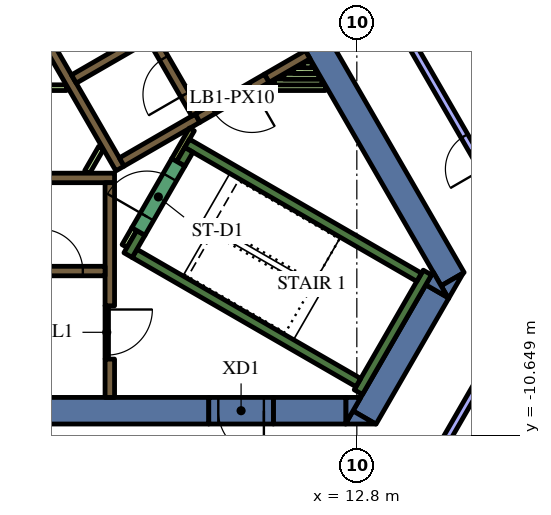
"""IFC4 building model, lengths in metres.
Left out: names, types, materials, properties, quantities, classifications, styles, units other than length and angle.
Written with IfcOpenShell. Run it as: python <this file> out.ifc"""

import sys

from ifc_helpers import new_model, si_unit, direction, frame, frame_2d, origin, place, context, subcontext, project, spatial, polyline, rectangle, outline, extrude, element, fill, save


model = new_model("IFC4")
c1 = context("Model", 3, precision=1e-05, world=origin(), true_north=direction((0.0, 1.0)))
c2 = subcontext(c1, "Body", "Model", "MODEL_VIEW")
j1 = project(units=[si_unit("LENGTHUNIT", "METRE"), si_unit("PLANEANGLEUNIT", "RADIAN")], contexts=[c1])
p1 = place(None, origin())
s1 = spatial("IfcSite", under=j1, at=p1, CompositionType="ELEMENT")
p2 = place(p1, origin())
s2 = spatial("IfcBuilding", under=s1, at=p2, CompositionType="ELEMENT")
p3 = place(p2, frame((0.0, 0.0, 247.8)))
s3 = spatial("IfcBuildingStorey", under=s2, at=p3, CompositionType="ELEMENT", Elevation=247.8)
p4 = place(p3, frame((9.085, 4.264, 0.0), z_axis=(0.0, 0.0, 1.0), x_axis=(0.499998082512, -0.866026510844, 0.0)))
e1 = element("IfcWall", 1, at=p4, inside=s3, PredefinedType="SOLIDWALL", context=c2, shape_type="SweptSolid", body=[
    extrude(rectangle(XDim=12.472, YDim=0.7, at=frame_2d((6.236, 0.0))), origin(), (0.0, 0.0, 1.0), 4.2),
])
p5 = place(p3, origin())
e2 = element("IfcWall", 2, at=p5, inside=s3, PredefinedType="SOLIDWALL", context=c2, shape_type="SweptSolid", body=[
    extrude(outline(polyline([(15.213, -7.05), (15.019, -6.714), (15.601, -6.378), (15.213, -7.05)])), origin(), (0.0, 0.0, 1.0), 4.2),
])
p6 = place(p3, frame((13.003, -10.179, 0.0), z_axis=(0.0, 0.0, 1.0), x_axis=(0.499972675833, 0.866041178825, 0.0)))
e3 = element("IfcWall", 3, at=p6, inside=s3, PredefinedType="SOLIDWALL", context=c2, shape_type="SweptSolid", body=[
    extrude(rectangle(XDim=3.829, YDim=0.7, at=frame_2d((1.915, 0.0))), origin(), (0.0, 0.0, 1.0), 4.2),
])
e4 = element("IfcWall", 4, at=p5, inside=s3, PredefinedType="SOLIDWALL", context=c2, shape_type="SweptSolid", body=[
    extrude(outline(polyline([(12.5, -10.35), (12.698, -10.005), (13.296, -10.35), (12.5, -10.35)])), origin(), (0.0, 0.0, 1.0), 4.2),
])
e5 = element("IfcWall", 5, at=p5, inside=s3, PredefinedType="SOLIDWALL", context=c2, shape_type="SweptSolid", body=[
    extrude(outline(polyline([(14.809, -6.35), (15.197, -7.022), (14.615, -6.686), (14.809, -6.35)])), origin(), (0.0, 0.0, 1.0), 4.2),
])
p7 = place(p3, frame((10.604, -10.0, 0.0), z_axis=(0.0, 0.0, 1.0), x_axis=(1.0, 0.0, 0.0)))
e6 = element("IfcWall", 6, at=p7, inside=s3, PredefinedType="SOLIDWALL", context=c2, shape_type="SweptSolid", body=[
    extrude(rectangle(XDim=1.909, YDim=0.7, at=frame_2d((0.955, 0.0))), origin(), (0.0, 0.0, 1.0), 4.2),
])
e7 = element("IfcWall", 7, at=p5, inside=s3, PredefinedType="SOLIDWALL", context=c2, shape_type="SweptSolid", body=[
    extrude(outline(polyline([(12.904, -9.65), (12.516, -10.322), (12.516, -9.65), (12.904, -9.65)])), origin(), (0.0, 0.0, 1.0), 4.2),
])
p8 = place(p3, frame((8.904, -10.0, 0.0), z_axis=(0.0, 0.0, 1.0), x_axis=(-1.0, 0.0, 0.0)))
e8 = element("IfcWall", 8, at=p8, inside=s3, PredefinedType="SOLIDWALL", context=c2, shape_type="SweptSolid", body=[
    extrude(rectangle(XDim=22.226, YDim=0.7, at=frame_2d((11.113, 0.0))), origin(), (0.0, 0.0, 1.0), 4.2),
])
p9 = place(p3, frame((12.84, -9.511, 0.0), z_axis=(0.0, 0.0, 1.0), x_axis=(0.500048121057, 0.865997619297, 0.0)))
e9 = element("IfcWall", 9, at=p9, inside=s3, PredefinedType="SOLIDWALL", context=c2, shape_type="SweptSolid", body=[
    extrude(rectangle(XDim=3.634, YDim=0.25, at=frame_2d((1.817, 0.0))), origin(), (0.0, 0.0, 1.0), 4.2),
])
p10 = place(p3, frame((12.84, -9.261, 0.0), z_axis=(0.0, 0.0, 1.0), x_axis=(-0.866013990052, 0.500019768644, 0.0)))
e10 = element("IfcWall", 10, at=p10, inside=s3, PredefinedType="SOLIDWALL", context=c2, shape_type="SweptSolid", body=[
    extrude(rectangle(XDim=6.8, YDim=0.25, at=frame_2d((3.4, 0.0))), origin(), (0.0, 0.0, 1.0), 4.2),
])
p11 = place(p3, frame((6.78, -5.906, 0.0), z_axis=(0.0, 0.0, 1.0), x_axis=(0.500223362819, 0.865896406789, 0.0)))
e11 = element("IfcWall", 11, at=p11, inside=s3, PredefinedType="SOLIDWALL", context=c2, shape_type="SweptSolid", body=[
    extrude(rectangle(XDim=0.675, YDim=0.25, at=frame_2d((0.337, 0.0))), origin(), (0.0, 0.0, 1.0), 4.2),
])
p12 = place(p3, frame((8.334, -2.964, 0.0), z_axis=(0.0, 0.0, 1.0), x_axis=(0.866016039709, -0.500016218704, 0.0)))
e12 = element("IfcWall", 12, at=p12, inside=s3, PredefinedType="SOLIDWALL", context=c2, shape_type="SweptSolid", body=[
    extrude(rectangle(XDim=7.05, YDim=0.25, at=frame_2d((3.525, 0.0))), origin(), (0.0, 0.0, 1.0), 4.2),
])
p13 = place(p3, frame((8.168, -3.503, 0.0), z_axis=(0.0, 0.0, 1.0), x_axis=(0.49972245349, 0.866185586049, 0.0)))
e13 = element("IfcWall", 13, at=p13, inside=s3, PredefinedType="SOLIDWALL", context=c2, shape_type="SweptSolid", body=[
    extrude(rectangle(XDim=0.425, YDim=0.25, at=frame_2d((0.212, 0.0))), origin(), (0.0, 0.0, 1.0), 4.2),
])
p14 = place(p3, frame((-5.545, -3.875, 0.0), z_axis=(0.0, 0.0, 1.0), x_axis=(1.0, 0.0, 0.0)))
e14 = element("IfcWall", 14, at=p14, inside=s3, PredefinedType="SOLIDWALL", context=c2, shape_type="SweptSolid", body=[
    extrude(rectangle(XDim=11.97, YDim=0.25, at=frame_2d((5.985, 0.0))), origin(), (0.0, 0.0, 1.0), 4.2),
])
p15 = place(p3, frame((6.3, -7.24, 0.0), z_axis=(0.0, 0.0, 1.0), x_axis=(0.0, 1.0, 0.0)))
e15 = element("IfcWall", 15, at=p15, inside=s3, PredefinedType="SOLIDWALL", context=c2, shape_type="SweptSolid", body=[
    extrude(rectangle(XDim=3.24, YDim=0.25, at=frame_2d((1.62, 0.0))), origin(), (0.0, 0.0, 1.0), 4.2),
])
p16 = place(p3, frame((6.3, -9.65, 0.0), z_axis=(0.0, 0.0, 1.0), x_axis=(0.0, 1.0, 0.0)))
e16 = element("IfcWall", 16, at=p16, inside=s3, PredefinedType="SOLIDWALL", context=c2, shape_type="SweptSolid", body=[
    extrude(rectangle(XDim=1.008, YDim=0.25, at=frame_2d((0.504, 0.0))), origin(), (0.0, 0.0, 1.0), 4.2),
])
p17 = place(p3, frame((11.507, -0.631, 0.0), z_axis=(0.0, 0.0, 1.0), x_axis=(-0.866025525965, -0.499999788377, 0.0)))
e17 = element("IfcWall", 17, at=p17, inside=s3, PredefinedType="SOLIDWALL", context=c2, shape_type="SweptSolid", body=[
    extrude(rectangle(XDim=1.245, YDim=0.25, at=frame_2d((0.622, 0.0))), origin(), (0.0, 0.0, 1.0), 4.2),
])
p18 = place(p3, frame((6.568, -3.627, 0.0), z_axis=(0.0, 0.0, 1.0), x_axis=(-0.499999455981, 0.866025717874, 0.0)))
e18 = element("IfcWall", 18, at=p18, inside=s3, PredefinedType="SOLIDWALL", context=c2, shape_type="SweptSolid", body=[
    extrude(rectangle(XDim=11.978, YDim=0.25, at=frame_2d((5.989, 0.0))), origin(), (0.0, 0.0, 1.0), 4.2),
])
p19 = place(p3, frame((5.354, -1.274, 0.0), z_axis=(0.0, 0.0, 1.0), x_axis=(0.866008176907, 0.50002983664, 0.0)))
e19 = element("IfcWall", 19, at=p19, inside=s3, PredefinedType="SOLIDWALL", context=c2, shape_type="SweptSolid", body=[
    extrude(rectangle(XDim=2.2, YDim=0.25, at=frame_2d((1.1, 0.0))), origin(), (0.0, 0.0, 1.0), 4.2),
])
p20 = place(p3, frame((6.614, -3.456, 0.0), z_axis=(0.0, 0.0, 1.0), x_axis=(0.866025089694, 0.500000544019, 0.0)))
e20 = element("IfcWall", 20, at=p20, inside=s3, PredefinedType="SOLIDWALL", context=c2, shape_type="SweptSolid", body=[
    extrude(rectangle(XDim=2.305, YDim=0.25, at=frame_2d((1.153, 0.0))), origin(), (0.0, 0.0, 1.0), 4.2),
])
p21 = place(p3, frame((10.362, -1.5, 0.0), z_axis=(0.0, 0.0, 1.0), x_axis=(1.0, 0.0, 0.0)))
e21 = element("IfcWall", 21, at=p21, inside=s3, PredefinedType="PARTITIONING", context=c2, shape_type="SweptSolid", body=[
    extrude(rectangle(XDim=1.61, YDim=0.15, at=frame_2d((0.805, 0.0))), origin(), (0.0, 0.0, 1.0), 3.45),
])
p22 = place(p3, frame((10.622, -1.35, 0.0), z_axis=(0.0, 0.0, 1.0), x_axis=(1.0, 0.0, 0.0)))
e22 = element("IfcWall", 22, at=p22, inside=s3, PredefinedType="PARTITIONING", context=c2, shape_type="SweptSolid", body=[
    extrude(rectangle(XDim=1.263, YDim=0.15, at=frame_2d((0.632, 0.0))), origin(), (0.0, 0.0, 1.0), 3.45),
])
p23 = place(p3, frame((10.882, -1.2, 0.0), z_axis=(0.0, 0.0, 1.0), x_axis=(1.0, 0.0, 0.0)))
e23 = element("IfcWall", 23, at=p23, inside=s3, PredefinedType="PARTITIONING", context=c2, shape_type="SweptSolid", body=[
    extrude(rectangle(XDim=0.917, YDim=0.15, at=frame_2d((0.459, 0.0))), origin(), (0.0, 0.0, 1.0), 3.45),
])
p24 = place(p3, frame((11.712, -1.05, 0.0), z_axis=(0.0, 0.0, 1.0), x_axis=(-1.0, 0.0, 0.0)))
e24 = element("IfcWall", 24, at=p24, inside=s3, PredefinedType="PARTITIONING", context=c2, shape_type="SweptSolid", body=[
    extrude(rectangle(XDim=0.571, YDim=0.15, at=frame_2d((0.285, 0.0))), origin(), (0.0, 0.0, 1.0), 3.45),
])
p25 = place(p3, frame((11.401, -0.9, 0.0), z_axis=(0.0, 0.0, 1.0), x_axis=(1.0, 0.0, 0.0)))
e25 = element("IfcWall", 25, at=p25, inside=s3, PredefinedType="PARTITIONING", context=c2, shape_type="SweptSolid", body=[
    extrude(rectangle(XDim=0.224, YDim=0.15, at=frame_2d((0.112, 0.0))), origin(), (0.0, 0.0, 1.0), 3.45),
])
p26 = place(p3, frame((6.945, -5.222, 0.0), z_axis=(0.0, 0.0, 1.0), x_axis=(-0.499818422106, -0.866130212453, 0.0)))
e26 = element("IfcWall", 26, at=p26, inside=s3, PredefinedType="PARTITIONING", context=c2, shape_type="SweptSolid", body=[
    extrude(rectangle(XDim=0.514, YDim=0.15, at=frame_2d((0.257, 0.0))), origin(), (0.0, 0.0, 1.0), 3.45),
])
p27 = place(p3, frame((8.459, -2.599, 0.0), z_axis=(0.0, 0.0, 1.0), x_axis=(-0.500041054325, -0.866001699761, 0.0)))
e27 = element("IfcWall", 27, at=p27, inside=s3, PredefinedType="PARTITIONING", context=c2, shape_type="SweptSolid", body=[
    extrude(rectangle(XDim=0.929, YDim=0.15, at=frame_2d((0.464, 0.0))), origin(), (0.0, 0.0, 1.0), 4.2),
])
p28 = place(p3, frame((5.705, -3.718, 0.0), z_axis=(0.0, 0.0, 1.0), x_axis=(0.499962090823, 0.866047289552, 0.0)))
e28 = element("IfcWall", 28, at=p28, inside=s3, PredefinedType="PARTITIONING", context=c2, shape_type="SweptSolid", body=[
    extrude(rectangle(XDim=0.735, YDim=0.15, at=frame_2d((0.367, 0.0))), origin(), (0.0, 0.0, 1.0), 3.45),
])
p29 = place(p3, frame((-4.2, -1.5, 0.0), z_axis=(0.0, 0.0, 1.0), x_axis=(1.0, 0.0, 0.0)))
e29 = element("IfcWall", 29, at=p29, inside=s3, PredefinedType="PARTITIONING", context=c2, shape_type="SweptSolid", body=[
    extrude(rectangle(XDim=9.359, YDim=0.15, at=frame_2d((4.68, 0.0))), origin(), (0.0, 0.0, 1.0), 3.45),
])
p30 = place(p3, frame((-6.175, -6.325, 0.0), z_axis=(0.0, 0.0, 1.0), x_axis=(1.0, 0.0, 0.0)))
e30 = element("IfcWall", 30, at=p30, inside=s3, PredefinedType="SOLIDWALL", context=c2, shape_type="SweptSolid", body=[
    extrude(rectangle(XDim=12.35, YDim=0.25, at=frame_2d((6.175, 0.0))), origin(), (0.0, 0.0, 1.0), 4.2),
])
p31 = place(p30, frame((0.585, 0.0, 0.0)))
e31 = element("IfcOpeningElement", 31, at=p31, cuts=e30, PredefinedType="OPENING", context=c2, shape_type="SweptSolid", body=[
    extrude(rectangle(XDim=1.1, YDim=2.1, at=frame_2d((0.55, 1.05))), frame((0.0, 0.135, 0.0), z_axis=(0.0, -1.0, 0.0), x_axis=(1.0, 0.0, 0.0)), (0.0, 0.0, 1.0), 0.27),
])
p32 = place(p30, frame((3.105, 0.0, 0.0)))
e32 = element("IfcOpeningElement", 32, at=p32, cuts=e30, PredefinedType="OPENING", context=c2, shape_type="SweptSolid", body=[
    extrude(rectangle(XDim=1.1, YDim=2.1, at=frame_2d((0.55, 1.05))), frame((0.0, 0.135, 0.0), z_axis=(0.0, -1.0, 0.0), x_axis=(1.0, 0.0, 0.0)), (0.0, 0.0, 1.0), 0.27),
])
p33 = place(p30, frame((5.625, 0.0, 0.0)))
e33 = element("IfcOpeningElement", 33, at=p33, cuts=e30, PredefinedType="OPENING", context=c2, shape_type="SweptSolid", body=[
    extrude(rectangle(XDim=1.1, YDim=2.1, at=frame_2d((0.55, 1.05))), frame((0.0, 0.135, 0.0), z_axis=(0.0, -1.0, 0.0), x_axis=(1.0, 0.0, 0.0)), (0.0, 0.0, 1.0), 0.27),
])
p34 = place(p30, frame((8.145, 0.0, 0.0)))
e34 = element("IfcOpeningElement", 34, at=p34, cuts=e30, PredefinedType="OPENING", context=c2, shape_type="SweptSolid", body=[
    extrude(rectangle(XDim=1.1, YDim=2.1, at=frame_2d((0.55, 1.05))), frame((0.0, 0.135, 0.0), z_axis=(0.0, -1.0, 0.0), x_axis=(1.0, 0.0, 0.0)), (0.0, 0.0, 1.0), 0.27),
])
p35 = place(p30, frame((10.665, 0.0, 0.0)))
e35 = element("IfcOpeningElement", 35, at=p35, cuts=e30, PredefinedType="OPENING", context=c2, shape_type="SweptSolid", body=[
    extrude(rectangle(XDim=1.1, YDim=2.1, at=frame_2d((0.55, 1.05))), frame((0.0, 0.135, 0.0), z_axis=(0.0, -1.0, 0.0), x_axis=(1.0, 0.0, 0.0)), (0.0, 0.0, 1.0), 0.27),
])
p36 = place(p3, frame((8.565, -2.185, 0.0), z_axis=(0.0, 0.0, 1.0), x_axis=(-0.499997954832, 0.866026584559, 0.0)))
e36 = element("IfcWall", 36, at=p36, inside=s3, PredefinedType="SOLIDWALL", context=c2, shape_type="SweptSolid", body=[
    extrude(rectangle(XDim=12.35, YDim=0.25, at=frame_2d((6.175, 0.0))), origin(), (0.0, 0.0, 1.0), 4.2),
])
p37 = place(p36, frame((0.585, 0.0, 0.0)))
e37 = element("IfcOpeningElement", 37, at=p37, cuts=e36, PredefinedType="OPENING", context=c2, shape_type="SweptSolid", body=[
    extrude(rectangle(XDim=1.1, YDim=2.1, at=frame_2d((0.55, 1.05))), frame((0.0, 0.135, 0.0), z_axis=(0.0, -1.0, 0.0), x_axis=(1.0, 0.0, 0.0)), (0.0, 0.0, 1.0), 0.27),
])
p38 = place(p3, frame((7.053, -5.284, 0.0), z_axis=(0.0, 0.0, 1.0), x_axis=(0.500078061341, 0.865980330357, 0.0)))
e38 = element("IfcWall", 38, at=p38, inside=s3, PredefinedType="SOLIDWALL", context=c2, shape_type="SweptSolid", body=[
    extrude(rectangle(XDim=2.1, YDim=0.4, at=frame_2d((1.05, 0.0))), origin(), (0.0, 0.0, 1.0), 4.2),
])
p39 = place(p38, frame((0.45, 0.0, 0.0)))
e39 = element("IfcOpeningElement", 39, at=p39, cuts=e38, PredefinedType="OPENING", context=c2, shape_type="SweptSolid", body=[
    extrude(rectangle(XDim=1.2, YDim=2.1, at=frame_2d((0.6, 1.05))), frame((0.0, 0.21, 0.0), z_axis=(0.0, -1.0, 0.0), x_axis=(1.0, 0.0, 0.0)), (0.0, 0.0, 1.0), 0.42),
])
p40 = place(p3, frame((6.22, -7.237, 0.0), z_axis=(0.0, 0.0, 1.0), x_axis=(0.0, -1.0, 0.0)))
e40 = element("IfcWall", 40, at=p40, inside=s3, PredefinedType="PARTITIONING", context=c2, shape_type="SweptSolid", body=[
    extrude(rectangle(XDim=1.4, YDim=0.09, at=frame_2d((0.7, 0.0))), origin(), (0.0, 0.0, 1.0), 3.45),
])
p41 = place(p40, frame((0.1, 0.0, 0.0)))
e41 = element("IfcOpeningElement", 41, at=p41, cuts=e40, PredefinedType="OPENING", context=c2, shape_type="SweptSolid", body=[
    extrude(rectangle(XDim=1.2, YDim=2.1, at=frame_2d((0.6, 1.05))), frame((0.0, 0.055, 0.0), z_axis=(0.0, -1.0, 0.0), x_axis=(1.0, 0.0, 0.0)), (0.0, 0.0, 1.0), 0.11),
])
p42 = place(p3, frame((10.429, -1.253, 0.0), z_axis=(0.0, 0.0, 1.0), x_axis=(-0.866009402589, -0.500027713859, 0.0)))
e42 = element("IfcWall", 42, at=p42, inside=s3, PredefinedType="SOLIDWALL", context=c2, shape_type="SweptSolid", body=[
    extrude(rectangle(XDim=2.1, YDim=0.25, at=frame_2d((1.05, 0.0))), origin(), (0.0, 0.0, 1.0), 4.2),
])
p43 = place(p42, frame((0.45, 0.0, 0.0)))
e43 = element("IfcOpeningElement", 43, at=p43, cuts=e42, PredefinedType="OPENING", context=c2, shape_type="SweptSolid", body=[
    extrude(rectangle(XDim=1.2, YDim=2.1, at=frame_2d((0.6, 1.05))), frame((0.0, 0.135, 0.0), z_axis=(0.0, -1.0, 0.0), x_axis=(1.0, 0.0, 0.0)), (0.0, 0.0, 1.0), 0.27),
])
p44 = place(p3, frame((10.604, -10.0, 0.0), z_axis=(0.0, 0.0, 1.0), x_axis=(-1.0, 0.0, 0.0)))
e44 = element("IfcWall", 44, at=p44, inside=s3, PredefinedType="SOLIDWALL", context=c2, shape_type="SweptSolid", body=[
    extrude(rectangle(XDim=1.7, YDim=0.7, at=frame_2d((0.85, 0.0))), origin(), (0.0, 0.0, 1.0), 4.2),
])
p45 = place(p44, frame((0.25, 0.0, 0.0)))
e45 = element("IfcOpeningElement", 45, at=p45, cuts=e44, PredefinedType="OPENING", context=c2, shape_type="SweptSolid", body=[
    extrude(rectangle(XDim=1.2, YDim=2.1, at=frame_2d((0.6, 1.05))), frame((0.0, 0.36, 0.0), z_axis=(0.0, -1.0, 0.0), x_axis=(1.0, 0.0, 0.0)), (0.0, 0.0, 1.0), 0.72),
])
p46 = place(p3, frame((14.498, -11.888, 0.0), z_axis=(0.0, 0.0, 1.0), x_axis=(0.500006981563, 0.86602137294, 0.0)))
e46 = element("IfcWall", 46, at=p46, inside=s3, PredefinedType="PARTITIONING", context=c2, shape_type="SweptSolid", body=[
    extrude(rectangle(XDim=2.946, YDim=0.2, at=frame_2d((1.473, 0.0))), origin(), (0.0, 0.0, 1.0), 3.45),
])
p47 = place(p3, frame((17.681, -6.324, 0.0), z_axis=(0.0, 0.0, 1.0), x_axis=(-0.50002695829, 0.866009838849, 0.0)))
e47 = element("IfcWall", 47, at=p47, inside=s3, PredefinedType="PARTITIONING", context=c2, shape_type="SweptSolid", body=[
    extrude(rectangle(XDim=7.287, YDim=0.2, at=frame_2d((3.644, 0.0))), origin(), (0.0, 0.0, 1.0), 3.45),
])
p48 = place(p47, frame((3.1, 0.0, 0.0)))
e48 = element("IfcOpeningElement", 48, at=p48, cuts=e47, PredefinedType="OPENING", context=c2, shape_type="SweptSolid", body=[
    extrude(rectangle(XDim=1.0, YDim=2.1, at=frame_2d((0.5, 1.05))), frame((0.0, 0.11, 0.0), z_axis=(0.0, -1.0, 0.0), x_axis=(1.0, 0.0, 0.0)), (0.0, 0.0, 1.0), 0.22),
])
p49 = place(p35, origin())
e49 = element("IfcDoor", 49, at=p49, inside=s3, OperationType="DOUBLE_DOOR_SLIDING", PredefinedType="DOOR", context=c2, shape_type="SweptSolid", body=[
    extrude(rectangle(XDim=1.1, YDim=2.1, at=frame_2d((0.55, 1.05))), frame((0.0, 0.025, 0.0), z_axis=(0.0, -1.0, 0.0), x_axis=(1.0, 0.0, 0.0)), (0.0, 0.0, 1.0), 0.05),
])
fill(e35, e49)
p50 = place(p37, origin())
e50 = element("IfcDoor", 50, at=p50, inside=s3, OperationType="DOUBLE_DOOR_SLIDING", PredefinedType="DOOR", context=c2, shape_type="SweptSolid", body=[
    extrude(rectangle(XDim=1.1, YDim=2.1, at=frame_2d((0.55, 1.05))), frame((0.0, 0.025, 0.0), z_axis=(0.0, -1.0, 0.0), x_axis=(1.0, 0.0, 0.0)), (0.0, 0.0, 1.0), 0.05),
])
fill(e37, e50)
p51 = place(p39, origin())
e51 = element("IfcDoor", 51, at=p51, inside=s3, OperationType="SINGLE_SWING_LEFT", PredefinedType="DOOR", context=c2, shape_type="SweptSolid", body=[
    extrude(rectangle(XDim=1.2, YDim=2.1, at=frame_2d((0.6, 1.05))), frame((0.0, 0.025, 0.0), z_axis=(0.0, -1.0, 0.0), x_axis=(1.0, 0.0, 0.0)), (0.0, 0.0, 1.0), 0.05),
])
fill(e39, e51)
p52 = place(p41, origin())
e52 = element("IfcDoor", 52, at=p52, inside=s3, OperationType="SINGLE_SWING_LEFT", PredefinedType="DOOR", context=c2, shape_type="SweptSolid", body=[
    extrude(rectangle(XDim=1.2, YDim=2.1, at=frame_2d((0.6, 1.05))), frame((0.0, 0.025, 0.0), z_axis=(0.0, -1.0, 0.0), x_axis=(1.0, 0.0, 0.0)), (0.0, 0.0, 1.0), 0.05),
])
fill(e41, e52)
p53 = place(p43, origin())
e53 = element("IfcDoor", 53, at=p53, inside=s3, OperationType="SINGLE_SWING_LEFT", PredefinedType="DOOR", context=c2, shape_type="SweptSolid", body=[
    extrude(rectangle(XDim=1.2, YDim=2.1, at=frame_2d((0.6, 1.05))), frame((0.0, 0.025, 0.0), z_axis=(0.0, -1.0, 0.0), x_axis=(1.0, 0.0, 0.0)), (0.0, 0.0, 1.0), 0.05),
])
fill(e43, e53)
p54 = place(p45, origin())
e54 = element("IfcDoor", 54, at=p54, inside=s3, OperationType="SINGLE_SWING_LEFT", PredefinedType="DOOR", context=c2, shape_type="SweptSolid", body=[
    extrude(rectangle(XDim=1.2, YDim=2.1, at=frame_2d((0.6, 1.05))), frame((0.0, 0.025, 0.0), z_axis=(0.0, -1.0, 0.0), x_axis=(1.0, 0.0, 0.0)), (0.0, 0.0, 1.0), 0.05),
])
fill(e45, e54)
p55 = place(p48, origin())
e55 = element("IfcDoor", 55, at=p55, inside=s3, OperationType="SINGLE_SWING_LEFT", PredefinedType="DOOR", context=c2, shape_type="SweptSolid", body=[
    extrude(rectangle(XDim=1.0, YDim=2.1, at=frame_2d((0.5, 1.05))), frame((0.0, 0.025, 0.0), z_axis=(0.0, -1.0, 0.0), x_axis=(1.0, 0.0, 0.0)), (0.0, 0.0, 1.0), 0.05),
])
fill(e48, e55)
save(model, sys.argv[1])
